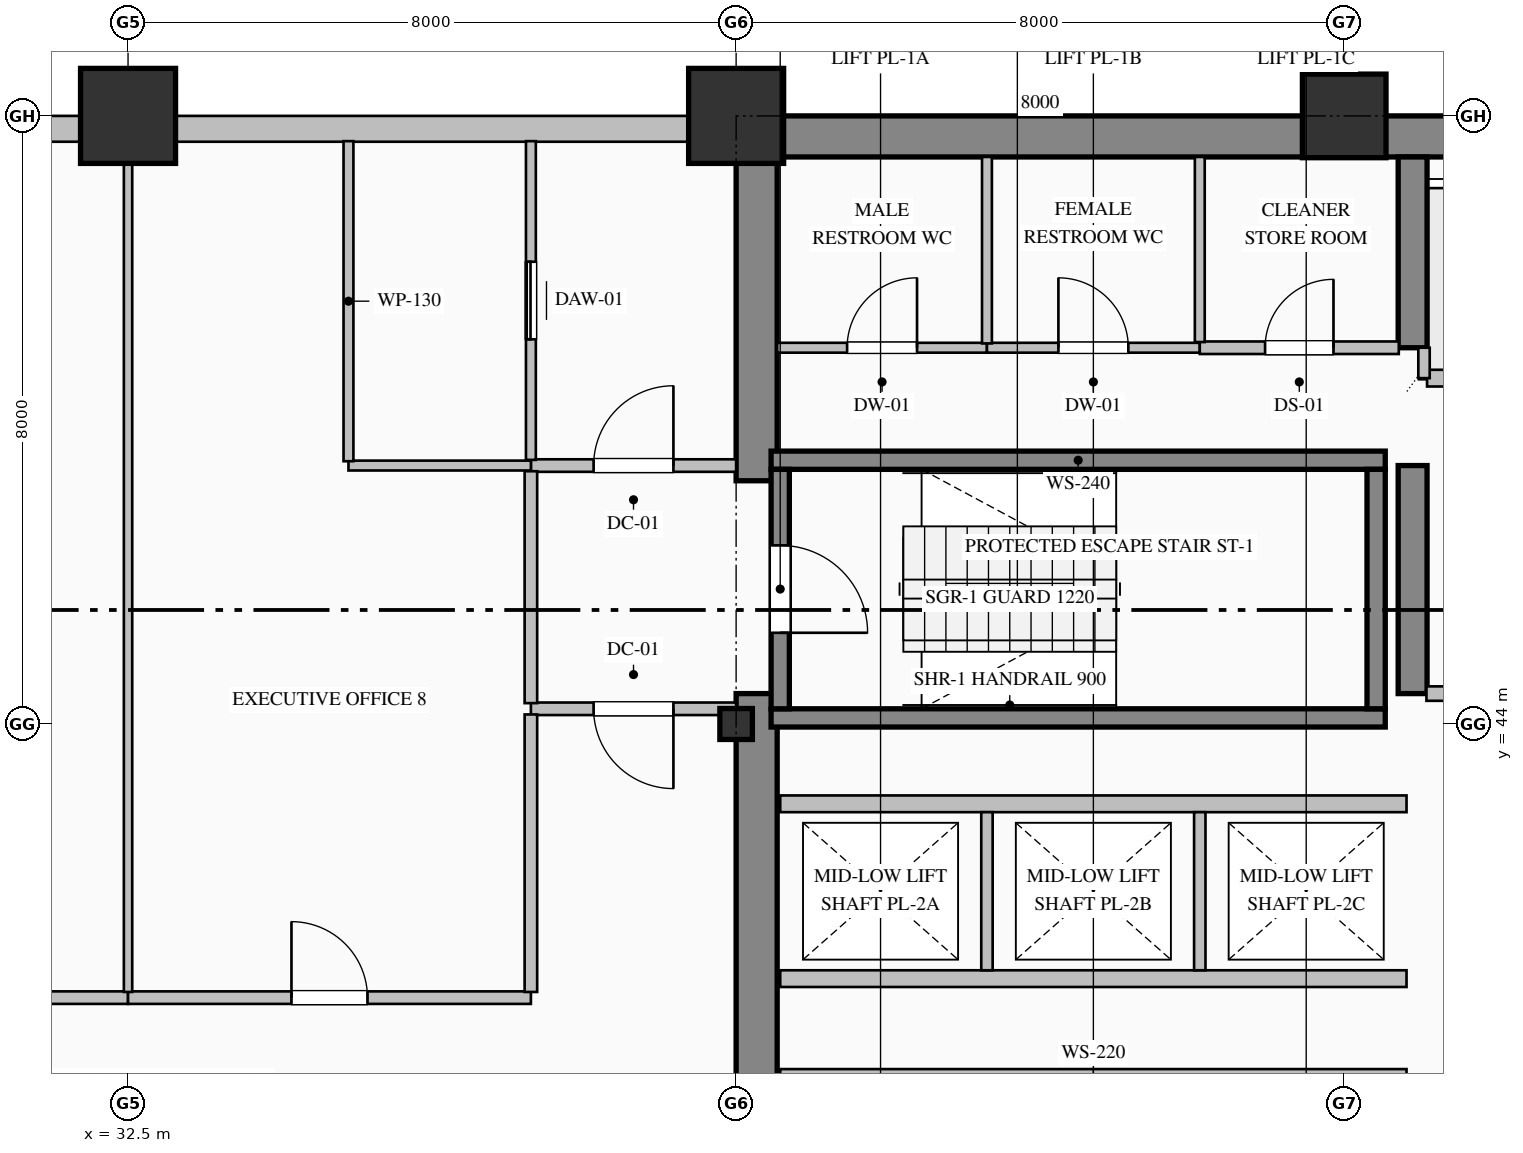
"""IFC4 building model, lengths in metres.
Left out: names, types, materials, properties, quantities, classifications, styles, units other than length and angle.
Written with IfcOpenShell. Run it as: python <this file> out.ifc"""

import sys

from ifc_helpers import new_model, si_unit, direction, frame, frame_2d, origin, origin_2d, place, context, subcontext, project, spatial, rectangle, hollow_rectangle, i_section, extrude, element, fill, save


model = new_model("IFC4")
c1 = context("Model", 3, precision=1e-05, world=origin(), true_north=direction((0.0, 1.0)))
c2 = subcontext(c1, "Body", "Model", "MODEL_VIEW")
j1 = project(units=[si_unit("LENGTHUNIT", "METRE"), si_unit("PLANEANGLEUNIT", "RADIAN")], contexts=[c1])
p1 = place(None, origin())
s1 = spatial("IfcSite", under=j1, at=p1, CompositionType="ELEMENT")
p2 = place(p1, origin())
s2 = spatial("IfcBuilding", under=s1, at=p2, CompositionType="ELEMENT")
p3 = place(p2, frame((0.0, 0.0, 40.2)))
s3 = spatial("IfcBuildingStorey", under=s2, at=p3, CompositionType="ELEMENT", Elevation=40.2)
p4 = place(p3, frame((40.5, 51.73, 0.0), z_axis=(0.0, 0.0, 1.0), x_axis=(1.0, 0.0, 0.0)))
e1 = element("IfcWall", 1, at=p4, inside=s3, PredefinedType="SHEAR", context=c2, shape_type="SweptSolid", body=[
    extrude(rectangle(XDim=23.5, YDim=0.54, at=frame_2d((11.75, 0.0))), origin(), (0.0, 0.0, 1.0), 3.75),
])
p5 = place(p3, frame((40.77, 36.54, 0.0), z_axis=(0.0, 0.0, 1.0), x_axis=(0.0, 1.0, 0.0)))
e2 = element("IfcWall", 2, at=p5, inside=s3, PredefinedType="SHEAR", context=c2, shape_type="SweptSolid", body=[
    extrude(rectangle(XDim=7.86, YDim=0.54, at=frame_2d((3.93, 0.0))), origin(), (0.0, 0.0, 1.0), 3.75),
])
p6 = place(p3, frame((40.77, 47.2, 0.0), z_axis=(0.0, 0.0, 1.0), x_axis=(0.0, 1.0, 0.0)))
e3 = element("IfcWall", 3, at=p6, inside=s3, PredefinedType="SHEAR", context=c2, shape_type="SweptSolid", body=[
    extrude(rectangle(XDim=4.26, YDim=0.54, at=frame_2d((2.13, 0.0))), origin(), (0.0, 0.0, 1.0), 3.75),
])
p7 = place(p3, frame((49.4, 44.4, 0.0), z_axis=(0.0, 0.0, 1.0), x_axis=(0.0, 1.0, 0.0)))
e4 = element("IfcWall", 4, at=p7, inside=s3, PredefinedType="SHEAR", context=c2, shape_type="SweptSolid", body=[
    extrude(rectangle(XDim=3.0, YDim=0.38, at=frame_2d((1.5, 0.0))), origin(), (0.0, 0.0, 1.0), 3.75),
])
p8 = place(p3, frame((49.4, 48.95, 0.0), z_axis=(0.0, 0.0, 1.0), x_axis=(0.0, 1.0, 0.0)))
e5 = element("IfcWall", 5, at=p8, inside=s3, PredefinedType="SHEAR", context=c2, shape_type="SweptSolid", body=[
    extrude(rectangle(XDim=2.51, YDim=0.38, at=frame_2d((1.255, 0.0))), origin(), (0.0, 0.0, 1.0), 3.75),
])
p9 = place(p3, frame((32.5, 52.0, 0.0), z_axis=(0.0, 0.0, 1.0), x_axis=(1.0, 0.0, 0.0)))
e6 = element("IfcColumn", 6, at=p9, inside=s3, PredefinedType="COLUMN", context=c2, shape_type="SweptSolid", body=[
    extrude(hollow_rectangle(XDim=1.25, YDim=1.25, WallThickness=0.045, at=origin_2d()), origin(), (0.0, 0.0, 1.0), 4.0),
])
p10 = place(p3, frame((40.5, 44.0, 0.0), z_axis=(0.0, 0.0, 1.0), x_axis=(1.0, 0.0, 0.0)))
e7 = element("IfcColumn", 7, at=p10, inside=s3, PredefinedType="COLUMN", context=c2, shape_type="SweptSolid", body=[
    extrude(i_section(OverallWidth=0.407, OverallDepth=0.428, WebThickness=0.02, FlangeThickness=0.035, FilletRadius=0.022, at=origin_2d()), origin(), (0.0, 0.0, 1.0), 4.0),
])
p11 = place(p3, frame((40.5, 52.0, 0.0), z_axis=(0.0, 0.0, 1.0), x_axis=(1.0, 0.0, 0.0)))
e8 = element("IfcColumn", 8, at=p11, inside=s3, PredefinedType="COLUMN", context=c2, shape_type="SweptSolid", body=[
    extrude(hollow_rectangle(XDim=1.25, YDim=1.25, WallThickness=0.045, at=origin_2d()), origin(), (0.0, 0.0, 1.0), 4.0),
])
p12 = place(p3, frame((48.5, 52.0, 0.0), z_axis=(0.0, 0.0, 1.0), x_axis=(1.0, 0.0, 0.0)))
e9 = element("IfcColumn", 9, at=p12, inside=s3, PredefinedType="COLUMN", context=c2, shape_type="SweptSolid", body=[
    extrude(hollow_rectangle(XDim=1.1, YDim=1.1, WallThickness=0.04, at=origin_2d()), origin(), (0.0, 0.0, 1.0), 4.0),
])
p13 = place(p3, frame((4.0, 51.83, 0.0), z_axis=(0.0, 0.0, 1.0), x_axis=(1.0, 0.0, 0.0)))
e10 = element("IfcWall", 10, at=p13, inside=s3, PredefinedType="SOLIDWALL", context=c2, shape_type="SweptSolid", body=[
    extrude(rectangle(XDim=36.52, YDim=0.34, at=frame_2d((18.26, 0.0))), origin(), (0.0, 0.0, 1.0), 3.25),
])
p14 = place(p13, frame((6.3, 0.0, 0.85)))
e11 = element("IfcOpeningElement", 11, at=p14, cuts=e10, PredefinedType="OPENING", context=c2, shape_type="SweptSolid", body=[
    extrude(rectangle(XDim=1.8, YDim=2.05, at=frame_2d((0.9, 1.025))), frame((0.0, 0.18, 0.0), z_axis=(0.0, -1.0, 0.0), x_axis=(1.0, 0.0, 0.0)), (0.0, 0.0, 1.0), 0.36),
])
p15 = place(p13, frame((17.1, 0.0, 0.85)))
e12 = element("IfcOpeningElement", 12, at=p15, cuts=e10, PredefinedType="OPENING", context=c2, shape_type="SweptSolid", body=[
    extrude(rectangle(XDim=1.8, YDim=2.05, at=frame_2d((0.9, 1.025))), frame((0.0, 0.18, 0.0), z_axis=(0.0, -1.0, 0.0), x_axis=(1.0, 0.0, 0.0)), (0.0, 0.0, 1.0), 0.36),
])
p16 = place(p13, frame((24.0, 0.0, 0.8)))
e13 = element("IfcOpeningElement", 13, at=p16, cuts=e10, PredefinedType="OPENING", context=c2, shape_type="SweptSolid", body=[
    extrude(rectangle(XDim=2.4, YDim=2.15, at=frame_2d((1.2, 1.075))), frame((0.0, 0.18, 0.0), z_axis=(0.0, -1.0, 0.0), x_axis=(1.0, 0.0, 0.0)), (0.0, 0.0, 1.0), 0.36),
])
for number, where, z_axis, x_axis in (
    (14, (40.96, 47.47, 0.0), (0.0, 0.0, 1.0), (1.0, 0.0, 0.0)),
    (15, (49.04, 44.08, 0.0), (0.0, 0.0, 1.0), (-1.0, 0.0, 0.0)),
):
    element("IfcWall", number, at=place(p3, frame(where, z_axis=z_axis, x_axis=x_axis)), inside=s3, PredefinedType="SOLIDWALL", context=c2, shape_type="SweptSolid", body=[
        extrude(rectangle(XDim=8.08, YDim=0.24, at=frame_2d((4.04, 0.0))), origin(), (0.0, 0.0, 1.0), 4.0),
    ])
p17 = place(p3, frame((41.08, 47.35, 0.0), z_axis=(0.0, 0.0, 1.0), x_axis=(0.0, -1.0, 0.0)))
e16 = element("IfcWall", 16, at=p17, inside=s3, PredefinedType="SOLIDWALL", context=c2, shape_type="SweptSolid", body=[
    extrude(rectangle(XDim=3.15, YDim=0.24, at=frame_2d((1.575, 0.0))), origin(), (0.0, 0.0, 1.0), 4.0),
])
p18 = place(p17, frame((1.0, 0.0, 0.0)))
e17 = element("IfcOpeningElement", 17, at=p18, cuts=e16, PredefinedType="OPENING", context=c2, shape_type="SweptSolid", body=[
    extrude(rectangle(XDim=1.15, YDim=2.2, at=frame_2d((0.575, 1.1))), frame((0.0, 0.13, 0.0), z_axis=(0.0, -1.0, 0.0), x_axis=(1.0, 0.0, 0.0)), (0.0, 0.0, 1.0), 0.26),
])
p19 = place(p3, frame((48.92, 44.2, 0.0), z_axis=(0.0, 0.0, 1.0), x_axis=(0.0, 1.0, 0.0)))
e18 = element("IfcWall", 18, at=p19, inside=s3, PredefinedType="SOLIDWALL", context=c2, shape_type="SweptSolid", body=[
    extrude(rectangle(XDim=3.15, YDim=0.24, at=frame_2d((1.575, 0.0))), origin(), (0.0, 0.0, 1.0), 4.0),
])
p20 = place(p3, frame((54.71, 48.55, 0.0), z_axis=(0.0, 0.0, 1.0), x_axis=(-1.0, 0.0, 0.0)))
e19 = element("IfcWall", 19, at=p20, inside=s3, PredefinedType="PARTITIONING", context=c2, shape_type="SweptSolid", body=[
    extrude(rectangle(XDim=5.12, YDim=0.22, at=frame_2d((2.56, 0.0))), origin(), (0.0, 0.0, 1.0), 3.75),
])
p21 = place(p20, frame((3.735, 0.0, 0.0)))
e20 = element("IfcOpeningElement", 20, at=p21, cuts=e19, PredefinedType="OPENING", context=c2, shape_type="SweptSolid", body=[
    extrude(rectangle(XDim=1.15, YDim=2.2, at=frame_2d((0.575, 1.1))), frame((0.0, 0.12, 0.0), z_axis=(0.0, -1.0, 0.0), x_axis=(1.0, 0.0, 0.0)), (0.0, 0.0, 1.0), 0.24),
])
p22 = place(p20, frame((0.935, 0.0, 0.0)))
e21 = element("IfcOpeningElement", 21, at=p22, cuts=e19, PredefinedType="OPENING", context=c2, shape_type="SweptSolid", body=[
    extrude(rectangle(XDim=1.15, YDim=2.2, at=frame_2d((0.575, 1.1))), frame((0.0, 0.12, 0.0), z_axis=(0.0, -1.0, 0.0), x_axis=(1.0, 0.0, 0.0)), (0.0, 0.0, 1.0), 0.24),
])
p23 = place(p3, frame((49.55, 48.55, 0.0), z_axis=(0.0, 0.0, 1.0), x_axis=(0.0, 1.0, 0.0)))
e22 = element("IfcWall", 22, at=p23, inside=s3, PredefinedType="PARTITIONING", context=c2, shape_type="SweptSolid", body=[
    extrude(rectangle(XDim=0.4, YDim=0.15, at=frame_2d((0.2, 0.0))), origin(), (0.0, 0.0, 1.0), 3.75),
])
for number, where, z_axis, x_axis in (
    (23, (41.08, 39.35, 0.0), (0.0, 0.0, 1.0), (1.0, 0.0, 0.0)),
    (24, (49.32, 40.65, 0.0), (0.0, 0.0, 1.0), (-1.0, 0.0, 0.0)),
    (25, (41.08, 42.95, 0.0), (0.0, 0.0, 1.0), (1.0, 0.0, 0.0)),
):
    element("IfcWall", number, at=place(p3, frame(where, z_axis=z_axis, x_axis=x_axis)), inside=s3, PredefinedType="PARTITIONING", context=c2, shape_type="SweptSolid", body=[
        extrude(rectangle(XDim=8.24, YDim=0.22, at=frame_2d((4.12, 0.0))), origin(), (0.0, 0.0, 1.0), 3.75),
    ])
for number, where, z_axis, x_axis in (
    (26, (43.8, 40.76, 0.0), (0.0, 0.0, 1.0), (0.0, 1.0, 0.0)),
    (27, (46.6, 40.76, 0.0), (0.0, 0.0, 1.0), (0.0, 1.0, 0.0)),
):
    element("IfcWall", number, at=place(p3, frame(where, z_axis=z_axis, x_axis=x_axis)), inside=s3, PredefinedType="PARTITIONING", context=c2, shape_type="SweptSolid", body=[
        extrude(rectangle(XDim=2.08, YDim=0.15, at=frame_2d((1.04, 0.0))), origin(), (0.0, 0.0, 1.0), 3.75),
    ])
p24 = place(p3, frame((37.8, 47.4, 0.0), z_axis=(0.0, 0.0, 1.0), x_axis=(1.0, 0.0, 0.0)))
e28 = element("IfcWall", 28, at=p24, inside=s3, PredefinedType="PARTITIONING", context=c2, shape_type="SweptSolid", body=[
    extrude(rectangle(XDim=2.7, YDim=0.165, at=frame_2d((1.35, 0.0))), origin(), (0.0, 0.0, 1.0), 3.75),
])
p25 = place(p24, frame((0.825, 0.0, 0.0)))
e29 = element("IfcOpeningElement", 29, at=p25, cuts=e28, PredefinedType="OPENING", context=c2, shape_type="SweptSolid", body=[
    extrude(rectangle(XDim=1.05, YDim=2.15, at=frame_2d((0.525, 1.075))), frame((0.0, 0.093, 0.0), z_axis=(0.0, -1.0, 0.0), x_axis=(1.0, 0.0, 0.0)), (0.0, 0.0, 1.0), 0.185),
])
p26 = place(p3, frame((40.5, 44.2, 0.0), z_axis=(0.0, 0.0, 1.0), x_axis=(-1.0, 0.0, 0.0)))
e30 = element("IfcWall", 30, at=p26, inside=s3, PredefinedType="PARTITIONING", context=c2, shape_type="SweptSolid", body=[
    extrude(rectangle(XDim=2.7, YDim=0.165, at=frame_2d((1.35, 0.0))), origin(), (0.0, 0.0, 1.0), 3.75),
])
p27 = place(p26, frame((0.825, 0.0, 0.0)))
e31 = element("IfcOpeningElement", 31, at=p27, cuts=e30, PredefinedType="OPENING", context=c2, shape_type="SweptSolid", body=[
    extrude(rectangle(XDim=1.05, YDim=2.15, at=frame_2d((0.525, 1.075))), frame((0.0, 0.093, 0.0), z_axis=(0.0, -1.0, 0.0), x_axis=(1.0, 0.0, 0.0)), (0.0, 0.0, 1.0), 0.185),
])
p28 = place(p3, frame((37.8, 44.274, 0.0), z_axis=(0.0, 0.0, 1.0), x_axis=(0.0, 1.0, 0.0)))
e32 = element("IfcWall", 32, at=p28, inside=s3, PredefinedType="PARTITIONING", context=c2, shape_type="SweptSolid", body=[
    extrude(rectangle(XDim=3.051, YDim=0.165, at=frame_2d((1.525, 0.0))), origin(), (0.0, 0.0, 1.0), 3.75),
])
p29 = place(p3, frame((37.8, 47.475, 0.0), z_axis=(0.0, 0.0, 1.0), x_axis=(0.0, 1.0, 0.0)))
e33 = element("IfcWall", 33, at=p29, inside=s3, PredefinedType="PARTITIONING", context=c2, shape_type="SweptSolid", body=[
    extrude(rectangle(XDim=4.193, YDim=0.13, at=frame_2d((2.097, 0.0))), origin(), (0.0, 0.0, 1.0), 3.75),
])
p30 = place(p29, frame((1.587, 0.0, 0.0)))
e34 = element("IfcOpeningElement", 34, at=p30, cuts=e33, PredefinedType="OPENING", context=c2, shape_type="SweptSolid", body=[
    extrude(rectangle(XDim=1.02, YDim=2.15, at=frame_2d((0.51, 1.075))), frame((0.0, 0.075, 0.0), z_axis=(0.0, -1.0, 0.0), x_axis=(1.0, 0.0, 0.0)), (0.0, 0.0, 1.0), 0.15),
])
p31 = place(p3, frame((37.8, 47.4, 0.0), z_axis=(0.0, 0.0, 1.0), x_axis=(-1.0, 0.0, 0.0)))
e35 = element("IfcWall", 35, at=p31, inside=s3, PredefinedType="PARTITIONING", context=c2, shape_type="SweptSolid", body=[
    extrude(rectangle(XDim=2.4, YDim=0.13, at=frame_2d((1.2, 0.0))), origin(), (0.0, 0.0, 1.0), 3.75),
])
p32 = place(p3, frame((35.4, 47.457, 0.0), z_axis=(0.0, 0.0, 1.0), x_axis=(0.0, 1.0, 0.0)))
e36 = element("IfcWall", 36, at=p32, inside=s3, PredefinedType="PARTITIONING", context=c2, shape_type="SweptSolid", body=[
    extrude(rectangle(XDim=4.211, YDim=0.13, at=frame_2d((2.105, 0.0))), origin(), (0.0, 0.0, 1.0), 3.75),
])
p33 = place(p3, frame((41.04, 48.95, 0.0), z_axis=(0.0, 0.0, 1.0), x_axis=(1.0, 0.0, 0.0)))
e37 = element("IfcWall", 37, at=p33, inside=s3, PredefinedType="PARTITIONING", context=c2, shape_type="SweptSolid", body=[
    extrude(rectangle(XDim=2.76, YDim=0.13, at=frame_2d((1.38, 0.0))), origin(), (0.0, 0.0, 1.0), 3.75),
])
p34 = place(p33, frame((0.92, 0.0, 0.0)))
e38 = element("IfcOpeningElement", 38, at=p34, cuts=e37, PredefinedType="OPENING", context=c2, shape_type="SweptSolid", body=[
    extrude(rectangle(XDim=0.92, YDim=2.15, at=frame_2d((0.46, 1.075))), frame((0.0, 0.075, 0.0), z_axis=(0.0, -1.0, 0.0), x_axis=(1.0, 0.0, 0.0)), (0.0, 0.0, 1.0), 0.15),
])
p35 = place(p3, frame((43.8, 48.95, 0.0), z_axis=(0.0, 0.0, 1.0), x_axis=(1.0, 0.0, 0.0)))
e39 = element("IfcWall", 39, at=p35, inside=s3, PredefinedType="PARTITIONING", context=c2, shape_type="SweptSolid", body=[
    extrude(rectangle(XDim=2.8, YDim=0.13, at=frame_2d((1.4, 0.0))), origin(), (0.0, 0.0, 1.0), 3.75),
])
p36 = place(p35, frame((0.94, 0.0, 0.0)))
e40 = element("IfcOpeningElement", 40, at=p36, cuts=e39, PredefinedType="OPENING", context=c2, shape_type="SweptSolid", body=[
    extrude(rectangle(XDim=0.92, YDim=2.15, at=frame_2d((0.46, 1.075))), frame((0.0, 0.075, 0.0), z_axis=(0.0, -1.0, 0.0), x_axis=(1.0, 0.0, 0.0)), (0.0, 0.0, 1.0), 0.15),
])
p37 = place(p3, frame((46.6, 48.95, 0.0), z_axis=(0.0, 0.0, 1.0), x_axis=(1.0, 0.0, 0.0)))
e41 = element("IfcWall", 41, at=p37, inside=s3, PredefinedType="PARTITIONING", context=c2, shape_type="SweptSolid", body=[
    extrude(rectangle(XDim=2.618, YDim=0.165, at=frame_2d((1.309, 0.0))), origin(), (0.0, 0.0, 1.0), 3.75),
])
p38 = place(p37, frame((0.859, 0.0, 0.0)))
e42 = element("IfcOpeningElement", 42, at=p38, cuts=e41, PredefinedType="OPENING", context=c2, shape_type="SweptSolid", body=[
    extrude(rectangle(XDim=0.9, YDim=2.15, at=frame_2d((0.45, 1.075))), frame((0.0, 0.093, 0.0), z_axis=(0.0, -1.0, 0.0), x_axis=(1.0, 0.0, 0.0)), (0.0, 0.0, 1.0), 0.185),
])
p39 = place(p3, frame((54.718, 44.4, 0.0), z_axis=(0.0, 0.0, 1.0), x_axis=(-1.0, 0.0, 0.0)))
e43 = element("IfcWall", 43, at=p39, inside=s3, PredefinedType="PARTITIONING", context=c2, shape_type="SweptSolid", body=[
    extrude(rectangle(XDim=5.136, YDim=0.19, at=frame_2d((2.568, 0.0))), origin(), (0.0, 0.0, 1.0), 3.75),
])
p40 = place(p39, frame((2.043, 0.0, 0.0)))
e44 = element("IfcOpeningElement", 44, at=p40, cuts=e43, PredefinedType="OPENING", context=c2, shape_type="SweptSolid", body=[
    extrude(rectangle(XDim=1.05, YDim=2.15, at=frame_2d((0.525, 1.075))), frame((0.0, 0.105, 0.0), z_axis=(0.0, -1.0, 0.0), x_axis=(1.0, 0.0, 0.0)), (0.0, 0.0, 1.0), 0.21),
])
p41 = place(p3, frame((43.8, 51.46, 0.0), z_axis=(0.0, 0.0, 1.0), x_axis=(0.0, -1.0, 0.0)))
e45 = element("IfcWall", 45, at=p41, inside=s3, PredefinedType="PARTITIONING", context=c2, shape_type="SweptSolid", body=[
    extrude(rectangle(XDim=2.453, YDim=0.13, at=frame_2d((1.227, 0.0))), origin(), (0.0, 0.0, 1.0), 3.75),
])
p42 = place(p3, frame((46.6, 51.46, 0.0), z_axis=(0.0, 0.0, 1.0), x_axis=(0.0, -1.0, 0.0)))
e46 = element("IfcWall", 46, at=p42, inside=s3, PredefinedType="PARTITIONING", context=c2, shape_type="SweptSolid", body=[
    extrude(rectangle(XDim=2.436, YDim=0.13, at=frame_2d((1.218, 0.0))), origin(), (0.0, 0.0, 1.0), 3.75),
])
p43 = place(p3, frame((26.8, 40.4, 0.0), z_axis=(0.0, 0.0, 1.0), x_axis=(1.0, 0.0, 0.0)))
e47 = element("IfcWall", 47, at=p43, inside=s3, PredefinedType="PARTITIONING", context=c2, shape_type="SweptSolid", body=[
    extrude(rectangle(XDim=5.7, YDim=0.165, at=frame_2d((2.85, 0.0))), origin(), (0.0, 0.0, 1.0), 3.75),
])
p44 = place(p43, frame((2.3, 0.0, 0.0)))
e48 = element("IfcOpeningElement", 48, at=p44, cuts=e47, PredefinedType="OPENING", context=c2, shape_type="SweptSolid", body=[
    extrude(rectangle(XDim=1.1, YDim=2.2, at=frame_2d((0.55, 1.1))), frame((0.0, 0.093, 0.0), z_axis=(0.0, -1.0, 0.0), x_axis=(1.0, 0.0, 0.0)), (0.0, 0.0, 1.0), 0.185),
])
p45 = place(p3, frame((32.5, 40.4, 0.0), z_axis=(0.0, 0.0, 1.0), x_axis=(1.0, 0.0, 0.0)))
e49 = element("IfcWall", 49, at=p45, inside=s3, PredefinedType="PARTITIONING", context=c2, shape_type="SweptSolid", body=[
    extrude(rectangle(XDim=5.3, YDim=0.165, at=frame_2d((2.65, 0.0))), origin(), (0.0, 0.0, 1.0), 3.75),
])
p46 = place(p45, frame((2.15, 0.0, 0.0)))
e50 = element("IfcOpeningElement", 50, at=p46, cuts=e49, PredefinedType="OPENING", context=c2, shape_type="SweptSolid", body=[
    extrude(rectangle(XDim=1.0, YDim=2.15, at=frame_2d((0.5, 1.075))), frame((0.0, 0.093, 0.0), z_axis=(0.0, -1.0, 0.0), x_axis=(1.0, 0.0, 0.0)), (0.0, 0.0, 1.0), 0.185),
])
p47 = place(p3, frame((37.8, 40.475, 0.0), z_axis=(0.0, 0.0, 1.0), x_axis=(0.0, 1.0, 0.0)))
e51 = element("IfcWall", 51, at=p47, inside=s3, PredefinedType="PARTITIONING", context=c2, shape_type="SweptSolid", body=[
    extrude(rectangle(XDim=3.651, YDim=0.165, at=frame_2d((1.825, 0.0))), origin(), (0.0, 0.0, 1.0), 3.75),
])
p48 = place(p3, frame((32.5, 51.668, 0.0), z_axis=(0.0, 0.0, 1.0), x_axis=(0.0, -1.0, 0.0)))
e52 = element("IfcWall", 52, at=p48, inside=s3, PredefinedType="MOVABLE", context=c2, shape_type="SweptSolid", body=[
    extrude(rectangle(XDim=11.193, YDim=0.11, at=frame_2d((5.597, 0.0))), origin(), (0.0, 0.0, 1.0), 3.75),
])
p49 = place(p18, origin())
e53 = element("IfcDoor", 53, at=p49, inside=s3, OperationType="SINGLE_SWING_RIGHT", PredefinedType="DOOR", context=c2, shape_type="SweptSolid", body=[
    extrude(rectangle(XDim=1.15, YDim=2.2, at=frame_2d((0.575, 1.1))), frame((0.0, 0.025, 0.0), z_axis=(0.0, -1.0, 0.0), x_axis=(1.0, 0.0, 0.0)), (0.0, 0.0, 1.0), 0.05),
])
fill(e17, e53)
p50 = place(p25, origin())
e54 = element("IfcDoor", 54, at=p50, inside=s3, OperationType="SINGLE_SWING_RIGHT", PredefinedType="DOOR", context=c2, shape_type="SweptSolid", body=[
    extrude(rectangle(XDim=1.05, YDim=2.15, at=frame_2d((0.525, 1.075))), frame((0.0, 0.025, 0.0), z_axis=(0.0, -1.0, 0.0), x_axis=(1.0, 0.0, 0.0)), (0.0, 0.0, 1.0), 0.05),
])
fill(e29, e54)
p51 = place(p27, origin())
e55 = element("IfcDoor", 55, at=p51, inside=s3, OperationType="SINGLE_SWING_LEFT", PredefinedType="DOOR", context=c2, shape_type="SweptSolid", body=[
    extrude(rectangle(XDim=1.05, YDim=2.15, at=frame_2d((0.525, 1.075))), frame((0.0, 0.025, 0.0), z_axis=(0.0, -1.0, 0.0), x_axis=(1.0, 0.0, 0.0)), (0.0, 0.0, 1.0), 0.05),
])
fill(e31, e55)
p52 = place(p30, origin())
e56 = element("IfcDoor", 56, at=p52, inside=s3, OperationType="SLIDING_TO_LEFT", PredefinedType="DOOR", context=c2, shape_type="SweptSolid", body=[
    extrude(rectangle(XDim=1.02, YDim=2.15, at=frame_2d((0.51, 1.075))), frame((0.0, 0.025, 0.0), z_axis=(0.0, -1.0, 0.0), x_axis=(1.0, 0.0, 0.0)), (0.0, 0.0, 1.0), 0.05),
])
fill(e34, e56)
p53 = place(p34, origin())
e57 = element("IfcDoor", 57, at=p53, inside=s3, OperationType="SINGLE_SWING_RIGHT", PredefinedType="DOOR", context=c2, shape_type="SweptSolid", body=[
    extrude(rectangle(XDim=0.92, YDim=2.15, at=frame_2d((0.46, 1.075))), frame((0.0, 0.025, 0.0), z_axis=(0.0, -1.0, 0.0), x_axis=(1.0, 0.0, 0.0)), (0.0, 0.0, 1.0), 0.05),
])
fill(e38, e57)
p54 = place(p36, origin())
e58 = element("IfcDoor", 58, at=p54, inside=s3, OperationType="SINGLE_SWING_LEFT", PredefinedType="DOOR", context=c2, shape_type="SweptSolid", body=[
    extrude(rectangle(XDim=0.92, YDim=2.15, at=frame_2d((0.46, 1.075))), frame((0.0, 0.025, 0.0), z_axis=(0.0, -1.0, 0.0), x_axis=(1.0, 0.0, 0.0)), (0.0, 0.0, 1.0), 0.05),
])
fill(e40, e58)
p55 = place(p38, origin())
e59 = element("IfcDoor", 59, at=p55, inside=s3, OperationType="SINGLE_SWING_RIGHT", PredefinedType="DOOR", context=c2, shape_type="SweptSolid", body=[
    extrude(rectangle(XDim=0.9, YDim=2.15, at=frame_2d((0.45, 1.075))), frame((0.0, 0.025, 0.0), z_axis=(0.0, -1.0, 0.0), x_axis=(1.0, 0.0, 0.0)), (0.0, 0.0, 1.0), 0.05),
])
fill(e42, e59)
p56 = place(p46, origin())
e60 = element("IfcDoor", 60, at=p56, inside=s3, OperationType="SINGLE_SWING_LEFT", PredefinedType="DOOR", context=c2, shape_type="SweptSolid", body=[
    extrude(rectangle(XDim=1.0, YDim=2.15, at=frame_2d((0.5, 1.075))), frame((0.0, 0.025, 0.0), z_axis=(0.0, -1.0, 0.0), x_axis=(1.0, 0.0, 0.0)), (0.0, 0.0, 1.0), 0.05),
])
fill(e50, e60)
save(model, sys.argv[1])
